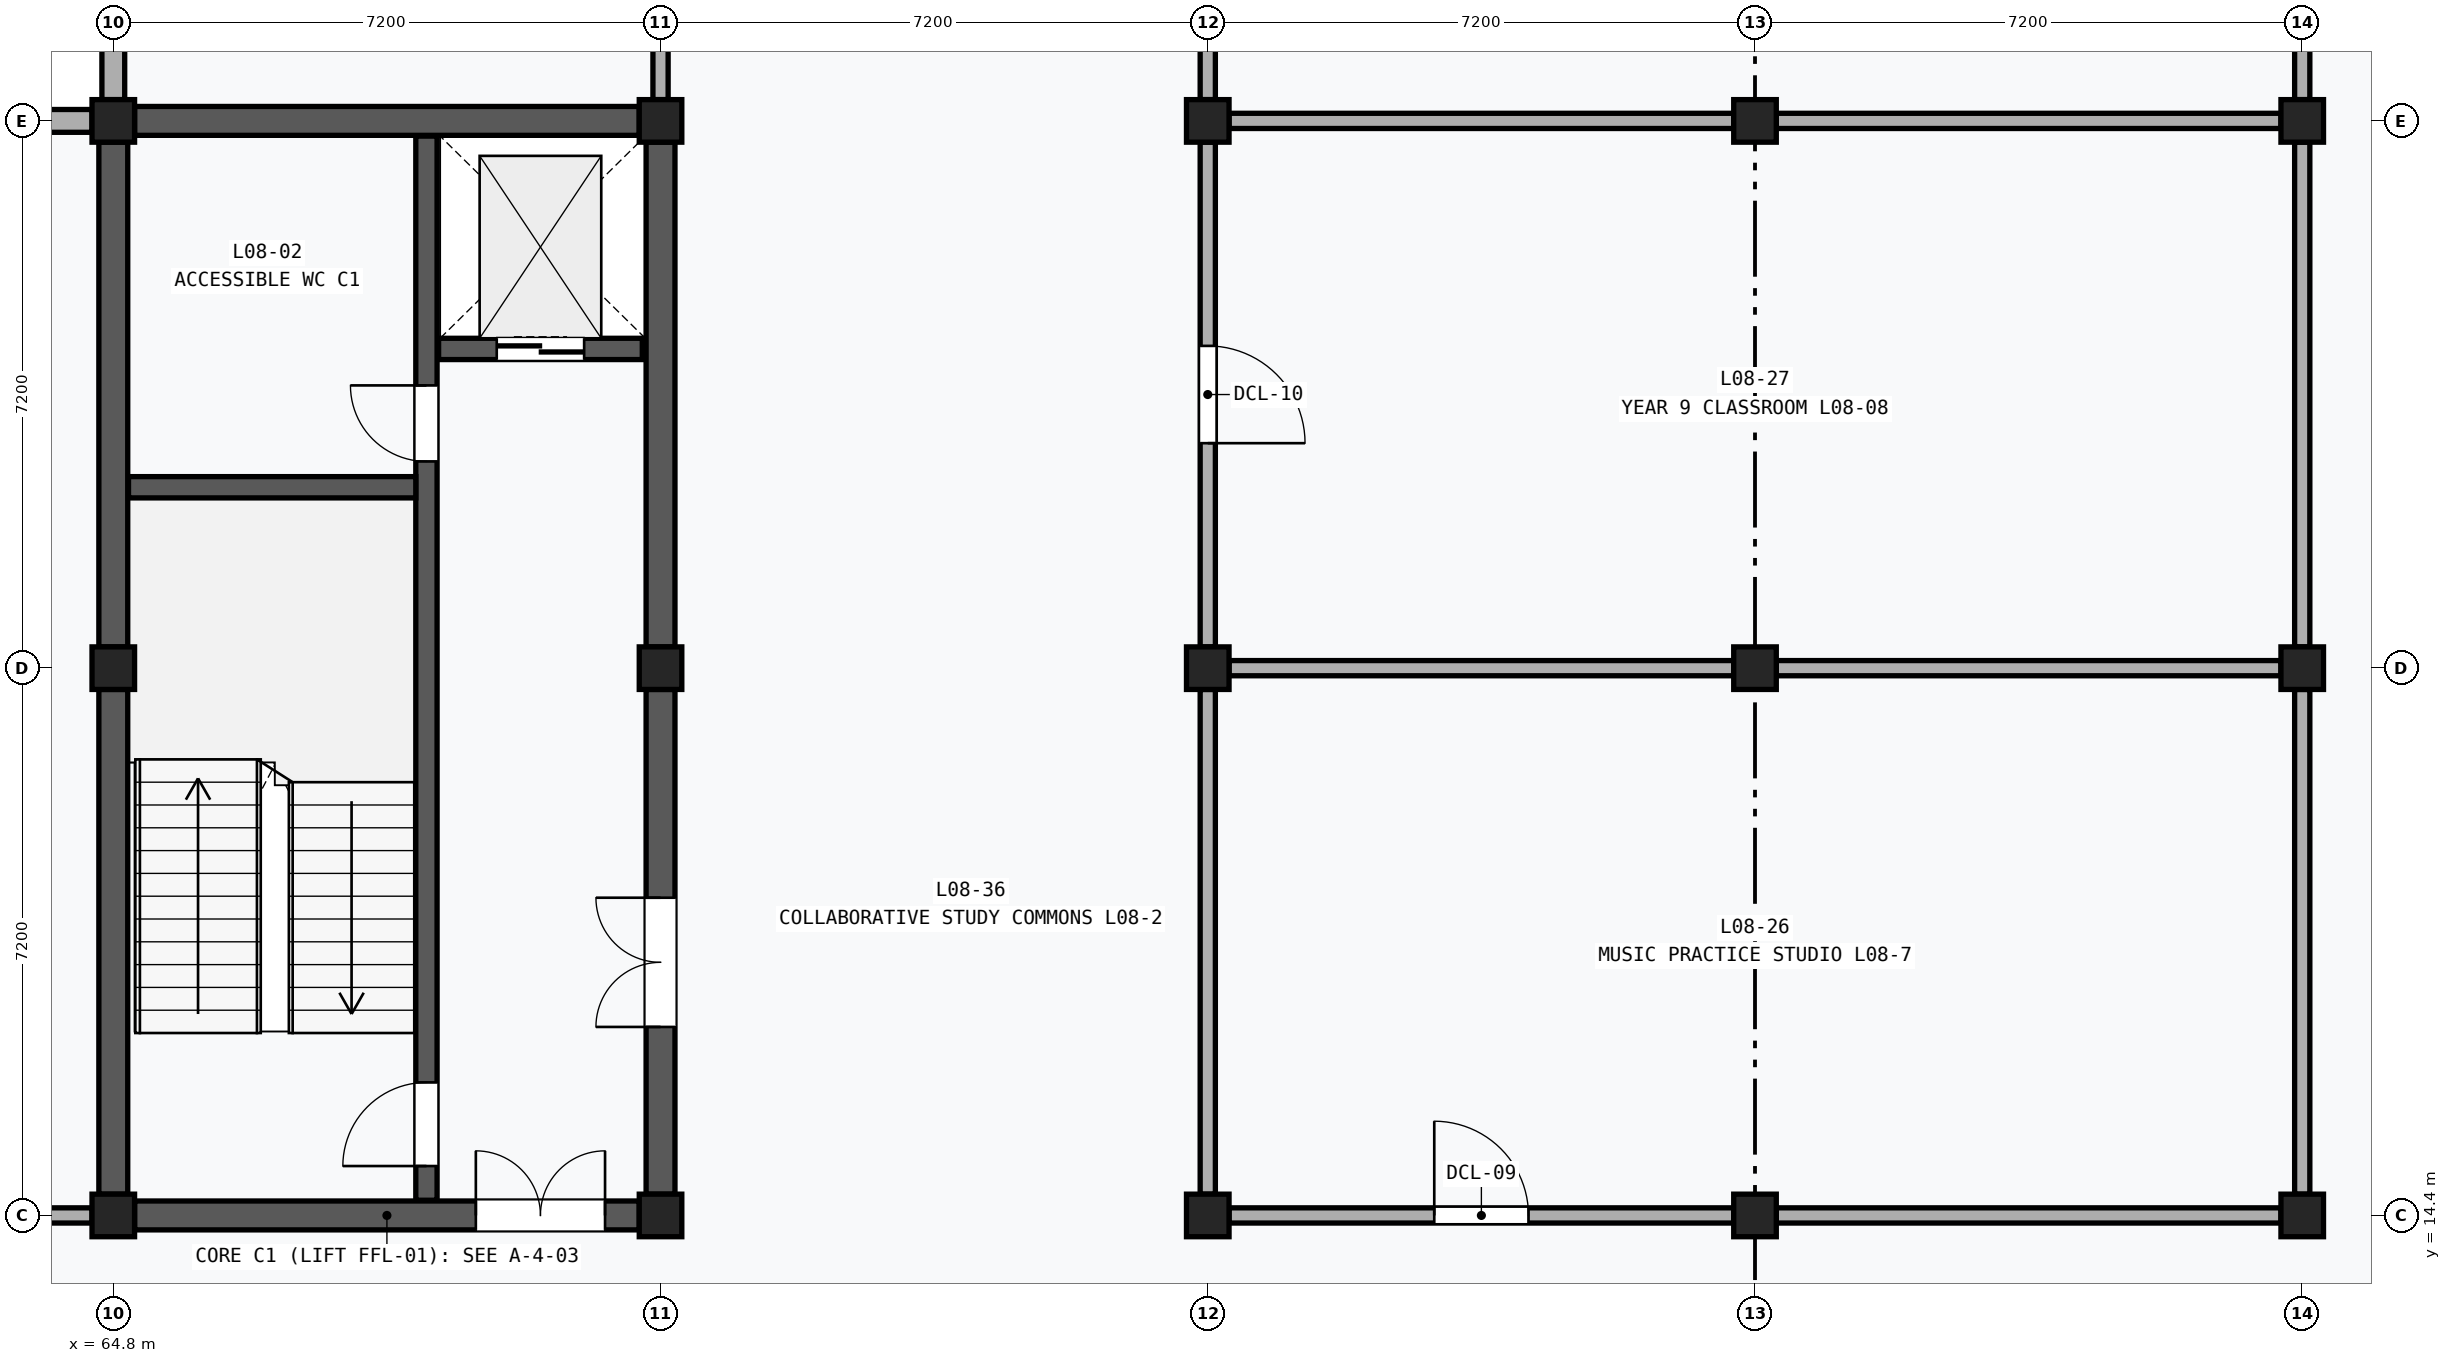
"""IFC4 building model, lengths in metres.
Left out: names, types, materials, properties, quantities, classifications, styles, units other than length and angle.
Written with IfcOpenShell. Run it as: python <this file> out.ifc"""

import sys

from ifc_helpers import new_model, si_unit, direction, frame, frame_2d, origin, origin_2d, place, context, subcontext, project, spatial, rectangle, extrude, element, fill, save


model = new_model("IFC4")
c1 = context("Model", 3, precision=1e-05, world=origin(), true_north=direction((0.0, 1.0)))
c2 = subcontext(c1, "Body", "Model", "MODEL_VIEW")
j1 = project(units=[si_unit("LENGTHUNIT", "METRE"), si_unit("PLANEANGLEUNIT", "RADIAN")], contexts=[c1])
p1 = place(None, origin())
s1 = spatial("IfcSite", under=j1, at=p1, CompositionType="ELEMENT")
p2 = place(p1, origin())
s2 = spatial("IfcBuilding", under=s1, at=p2, CompositionType="ELEMENT")
p3 = place(p2, frame((0.0, 0.0, 34.8)))
s3 = spatial("IfcBuildingStorey", under=s2, at=p3, CompositionType="ELEMENT", Elevation=34.8)
for number, where, z_axis, x_axis in (
    (1, (64.8, 14.4, 0.0), (0.0, 0.0, 1.0), (1.0, 0.0, 0.0)),
    (2, (64.8, 21.6, 0.0), (0.0, 0.0, 1.0), (1.0, 0.0, 0.0)),
    (3, (64.8, 28.8, 0.0), (0.0, 0.0, 1.0), (1.0, 0.0, 0.0)),
    (4, (72.0, 14.4, 0.0), (0.0, 0.0, 1.0), (1.0, 0.0, 0.0)),
    (5, (72.0, 21.6, 0.0), (0.0, 0.0, 1.0), (1.0, 0.0, 0.0)),
    (6, (72.0, 28.8, 0.0), (0.0, 0.0, 1.0), (1.0, 0.0, 0.0)),
    (7, (79.2, 14.4, 0.0), (0.0, 0.0, 1.0), (1.0, 0.0, 0.0)),
    (8, (79.2, 21.6, 0.0), (0.0, 0.0, 1.0), (1.0, 0.0, 0.0)),
    (9, (79.2, 28.8, 0.0), (0.0, 0.0, 1.0), (1.0, 0.0, 0.0)),
    (10, (86.4, 14.4, 0.0), (0.0, 0.0, 1.0), (1.0, 0.0, 0.0)),
    (11, (86.4, 21.6, 0.0), (0.0, 0.0, 1.0), (1.0, 0.0, 0.0)),
    (12, (86.4, 28.8, 0.0), (0.0, 0.0, 1.0), (1.0, 0.0, 0.0)),
    (13, (93.6, 14.4, 0.0), (0.0, 0.0, 1.0), (1.0, 0.0, 0.0)),
    (14, (93.6, 21.6, 0.0), (0.0, 0.0, 1.0), (1.0, 0.0, 0.0)),
    (15, (93.6, 28.8, 0.0), (0.0, 0.0, 1.0), (1.0, 0.0, 0.0)),
):
    element("IfcColumn", number, at=place(p3, frame(where, z_axis=z_axis, x_axis=x_axis)), inside=s3, PredefinedType="COLUMN", context=c2, shape_type="SweptSolid", body=[
        extrude(rectangle(XDim=0.56, YDim=0.56, at=origin_2d()), origin(), (0.0, 0.0, 1.0), 4.0),
    ])
p4 = place(p3, frame((57.78, 28.8, 0.0), z_axis=(0.0, 0.0, 1.0), x_axis=(1.0, 0.0, 0.0)))
e16 = element("IfcWall", 16, at=p4, inside=s3, PredefinedType="SOLIDWALL", context=c2, shape_type="SweptSolid", body=[
    extrude(rectangle(XDim=6.74, YDim=0.3, at=frame_2d((3.37, 0.0))), origin(), (0.0, 0.0, 1.0), 3.19),
])
p5 = place(p4, frame((1.87, 0.0, 0.85)))
e17 = element("IfcOpeningElement", 17, at=p5, cuts=e16, PredefinedType="OPENING", context=c2, shape_type="SweptSolid", body=[
    extrude(rectangle(XDim=3.0, YDim=2.0, at=frame_2d((1.5, 1.0))), frame((0.0, 0.162, 0.0), z_axis=(0.0, -1.0, 0.0), x_axis=(1.0, 0.0, 0.0)), (0.0, 0.0, 1.0), 0.324),
])
p6 = place(p3, frame((64.8, 29.08, 0.0), z_axis=(0.0, 0.0, 1.0), x_axis=(0.0, 1.0, 0.0)))
e18 = element("IfcWall", 18, at=p6, inside=s3, PredefinedType="SOLIDWALL", context=c2, shape_type="SweptSolid", body=[
    extrude(rectangle(XDim=6.64, YDim=0.3, at=frame_2d((3.32, 0.0))), origin(), (0.0, 0.0, 1.0), 3.19),
])
for number, where, z_axis, x_axis in (
    (19, (64.8, 14.68, 0.0), (0.0, 0.0, 1.0), (0.0, 1.0, 0.0)),
    (20, (64.8, 21.88, 0.0), (0.0, 0.0, 1.0), (0.0, 1.0, 0.0)),
):
    element("IfcWall", number, at=place(p3, frame(where, z_axis=z_axis, x_axis=x_axis)), inside=s3, PredefinedType="SHEAR", context=c2, shape_type="SweptSolid", body=[
        extrude(rectangle(XDim=6.64, YDim=0.38, at=frame_2d((3.32, 0.0))), origin(), (0.0, 0.0, 1.0), 3.03),
    ])
p7 = place(p3, frame((72.0, 14.68, 0.0), z_axis=(0.0, 0.0, 1.0), x_axis=(0.0, 1.0, 0.0)))
e21 = element("IfcWall", 21, at=p7, inside=s3, PredefinedType="SHEAR", context=c2, shape_type="SweptSolid", body=[
    extrude(rectangle(XDim=6.64, YDim=0.38, at=frame_2d((3.32, 0.0))), origin(), (0.0, 0.0, 1.0), 3.03),
])
p8 = place(p7, frame((2.2, 0.0, 0.0)))
e22 = element("IfcOpeningElement", 22, at=p8, cuts=e21, PredefinedType="OPENING", context=c2, shape_type="SweptSolid", body=[
    extrude(rectangle(XDim=1.7, YDim=2.25, at=frame_2d((0.85, 1.125))), frame((0.0, 0.202, 0.0), z_axis=(0.0, -1.0, 0.0), x_axis=(1.0, 0.0, 0.0)), (0.0, 0.0, 1.0), 0.404),
])
p9 = place(p3, frame((72.0, 21.88, 0.0), z_axis=(0.0, 0.0, 1.0), x_axis=(0.0, 1.0, 0.0)))
e23 = element("IfcWall", 23, at=p9, inside=s3, PredefinedType="SHEAR", context=c2, shape_type="SweptSolid", body=[
    extrude(rectangle(XDim=6.64, YDim=0.38, at=frame_2d((3.32, 0.0))), origin(), (0.0, 0.0, 1.0), 3.03),
])
p10 = place(p3, frame((65.08, 14.4, 0.0), z_axis=(0.0, 0.0, 1.0), x_axis=(1.0, 0.0, 0.0)))
e24 = element("IfcWall", 24, at=p10, inside=s3, PredefinedType="SHEAR", context=c2, shape_type="SweptSolid", body=[
    extrude(rectangle(XDim=6.64, YDim=0.38, at=frame_2d((3.32, 0.0))), origin(), (0.0, 0.0, 1.0), 3.03),
])
p11 = place(p10, frame((4.49, 0.0, 0.0)))
e25 = element("IfcOpeningElement", 25, at=p11, cuts=e24, PredefinedType="OPENING", context=c2, shape_type="SweptSolid", body=[
    extrude(rectangle(XDim=1.7, YDim=2.25, at=frame_2d((0.85, 1.125))), frame((0.0, 0.202, 0.0), z_axis=(0.0, -1.0, 0.0), x_axis=(1.0, 0.0, 0.0)), (0.0, 0.0, 1.0), 0.404),
])
p12 = place(p3, frame((65.08, 28.8, 0.0), z_axis=(0.0, 0.0, 1.0), x_axis=(1.0, 0.0, 0.0)))
e26 = element("IfcWall", 26, at=p12, inside=s3, PredefinedType="SHEAR", context=c2, shape_type="SweptSolid", body=[
    extrude(rectangle(XDim=6.64, YDim=0.38, at=frame_2d((3.32, 0.0))), origin(), (0.0, 0.0, 1.0), 3.03),
])
p13 = place(p3, frame((68.92, 14.6, 0.0), z_axis=(0.0, 0.0, 1.0), x_axis=(0.0, 1.0, 0.0)))
e27 = element("IfcWall", 27, at=p13, inside=s3, PredefinedType="SHEAR", context=c2, shape_type="SweptSolid", body=[
    extrude(rectangle(XDim=14.0, YDim=0.28, at=frame_2d((7.0, 0.0))), origin(), (0.0, 0.0, 1.0), 3.76),
])
p14 = place(p13, frame((0.45, 0.0, 0.0)))
e28 = element("IfcOpeningElement", 28, at=p14, cuts=e27, PredefinedType="OPENING", context=c2, shape_type="SweptSolid", body=[
    extrude(rectangle(XDim=1.1, YDim=2.15, at=frame_2d((0.55, 1.075))), frame((0.0, 0.152, 0.0), z_axis=(0.0, -1.0, 0.0), x_axis=(1.0, 0.0, 0.0)), (0.0, 0.0, 1.0), 0.304),
])
p15 = place(p13, frame((9.72, 0.0, 0.0)))
e29 = element("IfcOpeningElement", 29, at=p15, cuts=e27, PredefinedType="OPENING", context=c2, shape_type="SweptSolid", body=[
    extrude(rectangle(XDim=1.0, YDim=2.15, at=frame_2d((0.5, 1.075))), frame((0.0, 0.152, 0.0), z_axis=(0.0, -1.0, 0.0), x_axis=(1.0, 0.0, 0.0)), (0.0, 0.0, 1.0), 0.304),
])
p16 = place(p3, frame((65.0, 23.98, 0.0), z_axis=(0.0, 0.0, 1.0), x_axis=(1.0, 0.0, 0.0)))
e30 = element("IfcWall", 30, at=p16, inside=s3, PredefinedType="SHEAR", context=c2, shape_type="SweptSolid", body=[
    extrude(rectangle(XDim=3.78, YDim=0.28, at=frame_2d((1.89, 0.0))), origin(), (0.0, 0.0, 1.0), 3.76),
])
p17 = place(p3, frame((69.08, 25.8, 0.0), z_axis=(0.0, 0.0, 1.0), x_axis=(1.0, 0.0, 0.0)))
e31 = element("IfcWall", 31, at=p17, inside=s3, PredefinedType="SHEAR", context=c2, shape_type="SweptSolid", body=[
    extrude(rectangle(XDim=2.68, YDim=0.28, at=frame_2d((1.34, 0.0))), origin(), (0.0, 0.0, 1.0), 3.76),
])
p18 = place(p17, frame((0.765, 0.0, 0.0)))
e32 = element("IfcOpeningElement", 32, at=p18, cuts=e31, PredefinedType="OPENING", context=c2, shape_type="SweptSolid", body=[
    extrude(rectangle(XDim=1.15, YDim=2.2, at=frame_2d((0.575, 1.1))), frame((0.0, 0.152, 0.0), z_axis=(0.0, -1.0, 0.0), x_axis=(1.0, 0.0, 0.0)), (0.0, 0.0, 1.0), 0.304),
])
p19 = place(p3, frame((57.88, 14.4, 0.0), z_axis=(0.0, 0.0, 1.0), x_axis=(1.0, 0.0, 0.0)))
e33 = element("IfcWall", 33, at=p19, inside=s3, PredefinedType="PARTITIONING", context=c2, shape_type="SweptSolid", body=[
    extrude(rectangle(XDim=6.64, YDim=0.2, at=frame_2d((3.32, 0.0))), origin(), (0.0, 0.0, 1.0), 3.03),
])
p20 = place(p19, frame((2.8, 0.0, 0.0)))
e34 = element("IfcOpeningElement", 34, at=p20, cuts=e33, PredefinedType="OPENING", context=c2, shape_type="SweptSolid", body=[
    extrude(rectangle(XDim=1.04, YDim=2.14, at=frame_2d((0.52, 1.07))), frame((0.0, 0.112, 0.0), z_axis=(0.0, -1.0, 0.0), x_axis=(1.0, 0.0, 0.0)), (0.0, 0.0, 1.0), 0.224),
])
p21 = place(p3, frame((72.0, 29.08, 0.0), z_axis=(0.0, 0.0, 1.0), x_axis=(0.0, 1.0, 0.0)))
e35 = element("IfcWall", 35, at=p21, inside=s3, PredefinedType="PARTITIONING", context=c2, shape_type="SweptSolid", body=[
    extrude(rectangle(XDim=6.64, YDim=0.2, at=frame_2d((3.32, 0.0))), origin(), (0.0, 0.0, 1.0), 3.03),
])
p22 = place(p21, frame((2.74, 0.0, 0.0)))
e36 = element("IfcOpeningElement", 36, at=p22, cuts=e35, PredefinedType="OPENING", context=c2, shape_type="SweptSolid", body=[
    extrude(rectangle(XDim=1.16, YDim=2.22, at=frame_2d((0.58, 1.11))), frame((0.0, 0.112, 0.0), z_axis=(0.0, -1.0, 0.0), x_axis=(1.0, 0.0, 0.0)), (0.0, 0.0, 1.0), 0.224),
])
p23 = place(p3, frame((79.48, 14.4, 0.0), z_axis=(0.0, 0.0, 1.0), x_axis=(1.0, 0.0, 0.0)))
e37 = element("IfcWall", 37, at=p23, inside=s3, PredefinedType="PARTITIONING", context=c2, shape_type="SweptSolid", body=[
    extrude(rectangle(XDim=6.64, YDim=0.2, at=frame_2d((3.32, 0.0))), origin(), (0.0, 0.0, 1.0), 3.03),
])
p24 = place(p23, frame((2.7, 0.0, 0.0)))
e38 = element("IfcOpeningElement", 38, at=p24, cuts=e37, PredefinedType="OPENING", context=c2, shape_type="SweptSolid", body=[
    extrude(rectangle(XDim=1.24, YDim=2.26, at=frame_2d((0.62, 1.13))), frame((0.0, 0.112, 0.0), z_axis=(0.0, -1.0, 0.0), x_axis=(1.0, 0.0, 0.0)), (0.0, 0.0, 1.0), 0.224),
])
for number, where, z_axis, x_axis in (
    (39, (79.48, 21.6, 0.0), (0.0, 0.0, 1.0), (1.0, 0.0, 0.0)),
    (40, (79.2, 14.68, 0.0), (0.0, 0.0, 1.0), (0.0, 1.0, 0.0)),
    (41, (86.68, 14.4, 0.0), (0.0, 0.0, 1.0), (1.0, 0.0, 0.0)),
    (42, (86.68, 21.6, 0.0), (0.0, 0.0, 1.0), (1.0, 0.0, 0.0)),
    (43, (93.6, 14.68, 0.0), (0.0, 0.0, 1.0), (0.0, 1.0, 0.0)),
    (44, (79.48, 28.8, 0.0), (0.0, 0.0, 1.0), (1.0, 0.0, 0.0)),
):
    element("IfcWall", number, at=place(p3, frame(where, z_axis=z_axis, x_axis=x_axis)), inside=s3, PredefinedType="PARTITIONING", context=c2, shape_type="SweptSolid", body=[
        extrude(rectangle(XDim=6.64, YDim=0.2, at=frame_2d((3.32, 0.0))), origin(), (0.0, 0.0, 1.0), 3.03),
    ])
p25 = place(p3, frame((79.2, 21.88, 0.0), z_axis=(0.0, 0.0, 1.0), x_axis=(0.0, 1.0, 0.0)))
e45 = element("IfcWall", 45, at=p25, inside=s3, PredefinedType="PARTITIONING", context=c2, shape_type="SweptSolid", body=[
    extrude(rectangle(XDim=6.64, YDim=0.2, at=frame_2d((3.32, 0.0))), origin(), (0.0, 0.0, 1.0), 3.03),
])
p26 = place(p25, frame((2.68, 0.0, 0.0)))
e46 = element("IfcOpeningElement", 46, at=p26, cuts=e45, PredefinedType="OPENING", context=c2, shape_type="SweptSolid", body=[
    extrude(rectangle(XDim=1.28, YDim=2.28, at=frame_2d((0.64, 1.14))), frame((0.0, 0.112, 0.0), z_axis=(0.0, -1.0, 0.0), x_axis=(1.0, 0.0, 0.0)), (0.0, 0.0, 1.0), 0.224),
])
for number, where, z_axis, x_axis in (
    (47, (86.68, 28.8, 0.0), (0.0, 0.0, 1.0), (1.0, 0.0, 0.0)),
    (48, (93.6, 21.88, 0.0), (0.0, 0.0, 1.0), (0.0, 1.0, 0.0)),
):
    element("IfcWall", number, at=place(p3, frame(where, z_axis=z_axis, x_axis=x_axis)), inside=s3, PredefinedType="PARTITIONING", context=c2, shape_type="SweptSolid", body=[
        extrude(rectangle(XDim=6.64, YDim=0.2, at=frame_2d((3.32, 0.0))), origin(), (0.0, 0.0, 1.0), 3.03),
    ])
p27 = place(p3, frame((79.2, 29.08, 0.0), z_axis=(0.0, 0.0, 1.0), x_axis=(0.0, 1.0, 0.0)))
e49 = element("IfcWall", 49, at=p27, inside=s3, PredefinedType="PARTITIONING", context=c2, shape_type="SweptSolid", body=[
    extrude(rectangle(XDim=6.64, YDim=0.2, at=frame_2d((3.32, 0.0))), origin(), (0.0, 0.0, 1.0), 3.03),
])
p28 = place(p27, frame((2.82, 0.0, 0.0)))
e50 = element("IfcOpeningElement", 50, at=p28, cuts=e49, PredefinedType="OPENING", context=c2, shape_type="SweptSolid", body=[
    extrude(rectangle(XDim=1.0, YDim=2.1, at=frame_2d((0.5, 1.05))), frame((0.0, 0.112, 0.0), z_axis=(0.0, -1.0, 0.0), x_axis=(1.0, 0.0, 0.0)), (0.0, 0.0, 1.0), 0.224),
])
p29 = place(p3, frame((93.6, 29.08, 0.0), z_axis=(0.0, 0.0, 1.0), x_axis=(0.0, 1.0, 0.0)))
e51 = element("IfcWall", 51, at=p29, inside=s3, PredefinedType="PARTITIONING", context=c2, shape_type="SweptSolid", body=[
    extrude(rectangle(XDim=6.64, YDim=0.2, at=frame_2d((3.32, 0.0))), origin(), (0.0, 0.0, 1.0), 3.03),
])
p30 = place(p8, origin())
e52 = element("IfcDoor", 52, at=p30, inside=s3, OperationType="DOUBLE_DOOR_SINGLE_SWING", PredefinedType="DOOR", context=c2, shape_type="SweptSolid", body=[
    extrude(rectangle(XDim=1.7, YDim=2.25, at=frame_2d((0.85, 1.125))), frame((0.0, 0.025, 0.0), z_axis=(0.0, -1.0, 0.0), x_axis=(1.0, 0.0, 0.0)), (0.0, 0.0, 1.0), 0.05),
])
fill(e22, e52)
p31 = place(p11, origin())
e53 = element("IfcDoor", 53, at=p31, inside=s3, OperationType="DOUBLE_DOOR_SINGLE_SWING", PredefinedType="DOOR", context=c2, shape_type="SweptSolid", body=[
    extrude(rectangle(XDim=1.7, YDim=2.25, at=frame_2d((0.85, 1.125))), frame((0.0, 0.025, 0.0), z_axis=(0.0, -1.0, 0.0), x_axis=(1.0, 0.0, 0.0)), (0.0, 0.0, 1.0), 0.05),
])
fill(e25, e53)
p32 = place(p14, origin())
e54 = element("IfcDoor", 54, at=p32, inside=s3, OperationType="SINGLE_SWING_LEFT", PredefinedType="DOOR", context=c2, shape_type="SweptSolid", body=[
    extrude(rectangle(XDim=1.1, YDim=2.15, at=frame_2d((0.55, 1.075))), frame((0.0, 0.025, 0.0), z_axis=(0.0, -1.0, 0.0), x_axis=(1.0, 0.0, 0.0)), (0.0, 0.0, 1.0), 0.05),
])
fill(e28, e54)
p33 = place(p15, origin())
e55 = element("IfcDoor", 55, at=p33, inside=s3, OperationType="SINGLE_SWING_RIGHT", PredefinedType="DOOR", context=c2, shape_type="SweptSolid", body=[
    extrude(rectangle(XDim=1.0, YDim=2.15, at=frame_2d((0.5, 1.075))), frame((0.0, 0.025, 0.0), z_axis=(0.0, -1.0, 0.0), x_axis=(1.0, 0.0, 0.0)), (0.0, 0.0, 1.0), 0.05),
])
fill(e29, e55)
p34 = place(p18, frame((1.15, 0.0, 0.0), z_axis=(0.0, 0.0, 1.0), x_axis=(-1.0, 0.0, 0.0)))
e56 = element("IfcDoor", 56, at=p34, inside=s3, OperationType="DOUBLE_DOOR_SLIDING", PredefinedType="DOOR", context=c2, shape_type="SweptSolid", body=[
    extrude(rectangle(XDim=1.15, YDim=2.2, at=frame_2d((0.575, 1.1))), frame((0.0, 0.025, 0.0), z_axis=(0.0, -1.0, 0.0), x_axis=(1.0, 0.0, 0.0)), (0.0, 0.0, 1.0), 0.05),
])
fill(e32, e56)
p35 = place(p24, origin())
e57 = element("IfcDoor", 57, at=p35, inside=s3, OperationType="SINGLE_SWING_LEFT", PredefinedType="DOOR", context=c2, shape_type="SweptSolid", body=[
    extrude(rectangle(XDim=1.24, YDim=2.26, at=frame_2d((0.62, 1.13))), frame((0.0, 0.025, 0.0), z_axis=(0.0, -1.0, 0.0), x_axis=(1.0, 0.0, 0.0)), (0.0, 0.0, 1.0), 0.05),
])
fill(e38, e57)
p36 = place(p26, frame((1.28, 0.0, 0.0), z_axis=(0.0, 0.0, 1.0), x_axis=(-1.0, 0.0, 0.0)))
e58 = element("IfcDoor", 58, at=p36, inside=s3, OperationType="SINGLE_SWING_RIGHT", PredefinedType="DOOR", context=c2, shape_type="SweptSolid", body=[
    extrude(rectangle(XDim=1.28, YDim=2.28, at=frame_2d((0.64, 1.14))), frame((0.0, 0.025, 0.0), z_axis=(0.0, -1.0, 0.0), x_axis=(1.0, 0.0, 0.0)), (0.0, 0.0, 1.0), 0.05),
])
fill(e46, e58)
save(model, sys.argv[1])
